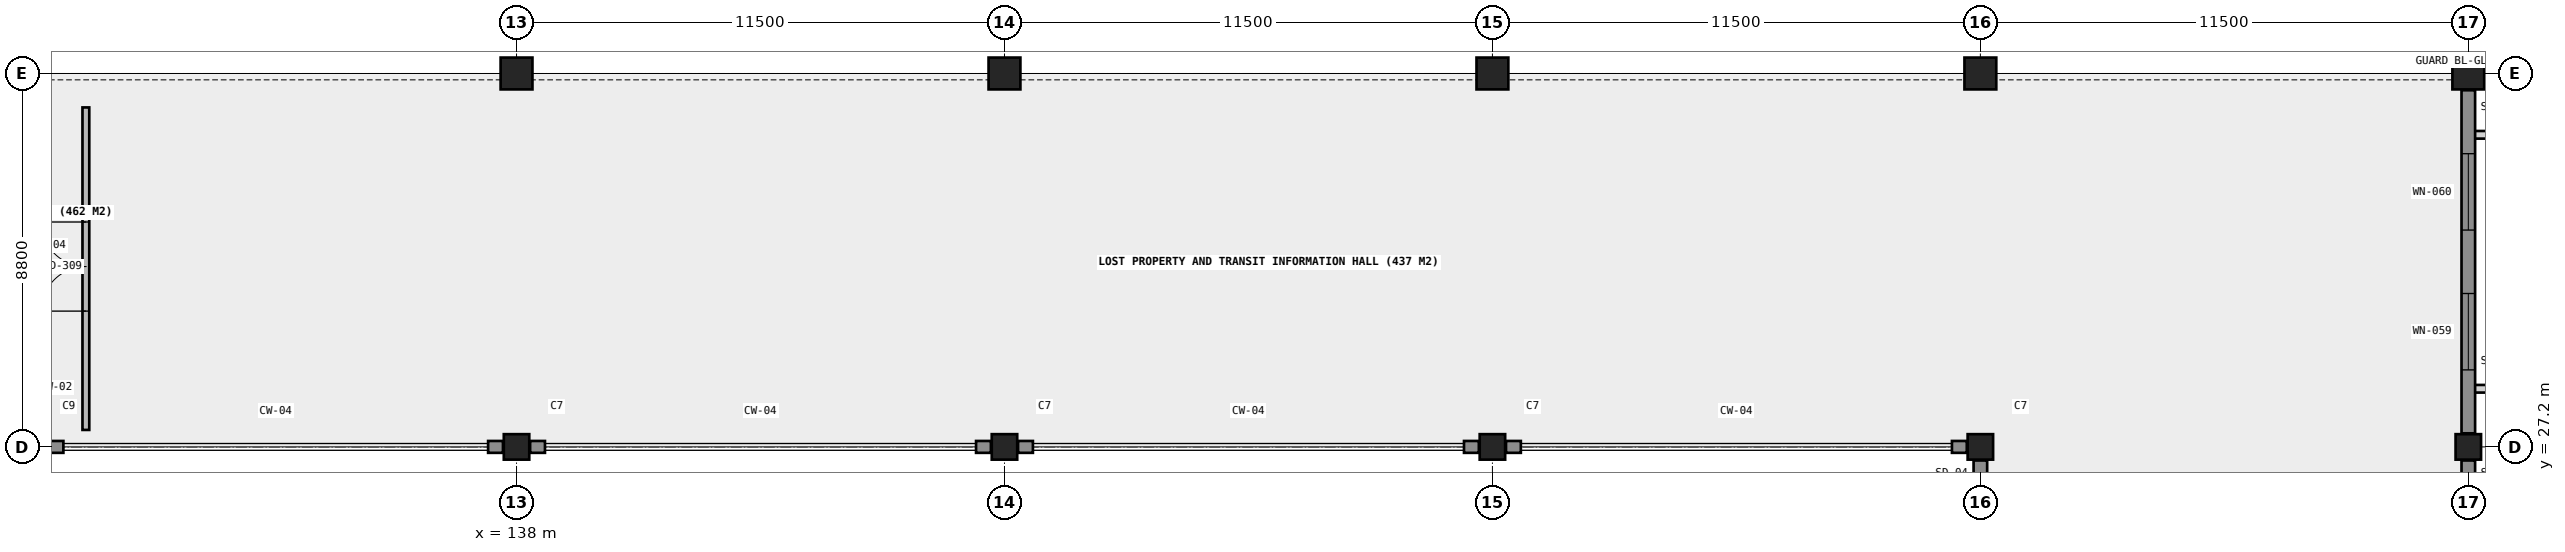
"""IFC4 building model, lengths in metres.
Left out: names, types, materials, properties, quantities, classifications, styles, units other than length and angle.
Written with IfcOpenShell. Run it as: python <this file> out.ifc"""

import sys

from ifc_helpers import new_model, si_unit, direction, frame, frame_2d, origin, origin_2d, place, context, subcontext, project, spatial, rectangle, extrude, element, fill, save


model = new_model("IFC4")
c1 = context("Model", 3, precision=1e-05, world=origin(), true_north=direction((0.0, 1.0)))
c2 = subcontext(c1, "Body", "Model", "MODEL_VIEW")
j1 = project(units=[si_unit("LENGTHUNIT", "METRE"), si_unit("PLANEANGLEUNIT", "RADIAN")], contexts=[c1])
p1 = place(None, origin())
s1 = spatial("IfcSite", under=j1, at=p1, CompositionType="ELEMENT")
p2 = place(p1, origin())
s2 = spatial("IfcBuilding", under=s1, at=p2, CompositionType="ELEMENT")
p3 = place(p2, frame((0.0, 0.0, 4.2)))
s3 = spatial("IfcBuildingStorey", under=s2, at=p3, CompositionType="ELEMENT", Elevation=4.2)
p4 = place(p3, frame((138.0, 27.2, 0.0), z_axis=(0.0, 0.0, 1.0), x_axis=(1.0, 0.0, 0.0)))
e1 = element("IfcColumn", 1, at=p4, inside=s3, PredefinedType="COLUMN", context=c2, shape_type="SweptSolid", body=[
    extrude(rectangle(XDim=0.6, YDim=0.6, at=origin_2d()), origin(), (0.0, 0.0, 1.0), 4.2),
])
p5 = place(p3, frame((138.0, 36.0, 0.0), z_axis=(0.0, 0.0, 1.0), x_axis=(1.0, 0.0, 0.0)))
e2 = element("IfcColumn", 2, at=p5, inside=s3, PredefinedType="COLUMN", context=c2, shape_type="SweptSolid", body=[
    extrude(rectangle(XDim=0.75, YDim=0.75, at=origin_2d()), origin(), (0.0, 0.0, 1.0), 4.2),
])
p6 = place(p3, frame((149.5, 27.2, 0.0), z_axis=(0.0, 0.0, 1.0), x_axis=(1.0, 0.0, 0.0)))
e3 = element("IfcColumn", 3, at=p6, inside=s3, PredefinedType="COLUMN", context=c2, shape_type="SweptSolid", body=[
    extrude(rectangle(XDim=0.6, YDim=0.6, at=origin_2d()), origin(), (0.0, 0.0, 1.0), 4.2),
])
p7 = place(p3, frame((149.5, 36.0, 0.0), z_axis=(0.0, 0.0, 1.0), x_axis=(1.0, 0.0, 0.0)))
e4 = element("IfcColumn", 4, at=p7, inside=s3, PredefinedType="COLUMN", context=c2, shape_type="SweptSolid", body=[
    extrude(rectangle(XDim=0.75, YDim=0.75, at=origin_2d()), origin(), (0.0, 0.0, 1.0), 4.2),
])
p8 = place(p3, frame((161.0, 27.2, 0.0), z_axis=(0.0, 0.0, 1.0), x_axis=(1.0, 0.0, 0.0)))
e5 = element("IfcColumn", 5, at=p8, inside=s3, PredefinedType="COLUMN", context=c2, shape_type="SweptSolid", body=[
    extrude(rectangle(XDim=0.6, YDim=0.6, at=origin_2d()), origin(), (0.0, 0.0, 1.0), 4.2),
])
p9 = place(p3, frame((161.0, 36.0, 0.0), z_axis=(0.0, 0.0, 1.0), x_axis=(1.0, 0.0, 0.0)))
e6 = element("IfcColumn", 6, at=p9, inside=s3, PredefinedType="COLUMN", context=c2, shape_type="SweptSolid", body=[
    extrude(rectangle(XDim=0.75, YDim=0.75, at=origin_2d()), origin(), (0.0, 0.0, 1.0), 4.2),
])
p10 = place(p3, frame((172.5, 27.2, 0.0), z_axis=(0.0, 0.0, 1.0), x_axis=(1.0, 0.0, 0.0)))
e7 = element("IfcColumn", 7, at=p10, inside=s3, PredefinedType="COLUMN", context=c2, shape_type="SweptSolid", body=[
    extrude(rectangle(XDim=0.6, YDim=0.6, at=origin_2d()), origin(), (0.0, 0.0, 1.0), 4.2),
])
p11 = place(p3, frame((172.5, 36.0, 0.0), z_axis=(0.0, 0.0, 1.0), x_axis=(1.0, 0.0, 0.0)))
e8 = element("IfcColumn", 8, at=p11, inside=s3, PredefinedType="COLUMN", context=c2, shape_type="SweptSolid", body=[
    extrude(rectangle(XDim=0.75, YDim=0.75, at=origin_2d()), origin(), (0.0, 0.0, 1.0), 4.2),
])
p12 = place(p3, frame((184.0, 27.2, 0.0), z_axis=(0.0, 0.0, 1.0), x_axis=(1.0, 0.0, 0.0)))
e9 = element("IfcColumn", 9, at=p12, inside=s3, PredefinedType="COLUMN", context=c2, shape_type="SweptSolid", body=[
    extrude(rectangle(XDim=0.6, YDim=0.6, at=origin_2d()), origin(), (0.0, 0.0, 1.0), 4.2),
])
p13 = place(p3, frame((184.0, 36.0, 0.0), z_axis=(0.0, 0.0, 1.0), x_axis=(1.0, 0.0, 0.0)))
e10 = element("IfcColumn", 10, at=p13, inside=s3, PredefinedType="COLUMN", context=c2, shape_type="SweptSolid", body=[
    extrude(rectangle(XDim=0.75, YDim=0.75, at=origin_2d()), origin(), (0.0, 0.0, 1.0), 4.2),
])
p14 = place(p3, frame((126.97, 27.2, 0.0), z_axis=(0.0, 0.0, 1.0), x_axis=(1.0, 0.0, 0.0)))
e11 = element("IfcWall", 11, at=p14, inside=s3, PredefinedType="SOLIDWALL", context=c2, shape_type="SweptSolid", body=[
    extrude(rectangle(XDim=0.35, YDim=0.28, at=frame_2d((0.175, 0.0))), origin(), (0.0, 0.0, 1.0), 3.84),
])
for number, where, z_axis, x_axis in (
    (12, (137.33, 27.2, 0.0), (0.0, 0.0, 1.0), (1.0, 0.0, 0.0)),
    (13, (138.32, 27.2, 0.0), (0.0, 0.0, 1.0), (1.0, 0.0, 0.0)),
    (14, (148.83, 27.2, 0.0), (0.0, 0.0, 1.0), (1.0, 0.0, 0.0)),
    (15, (149.82, 27.2, 0.0), (0.0, 0.0, 1.0), (1.0, 0.0, 0.0)),
    (16, (160.33, 27.2, 0.0), (0.0, 0.0, 1.0), (1.0, 0.0, 0.0)),
    (17, (161.32, 27.2, 0.0), (0.0, 0.0, 1.0), (1.0, 0.0, 0.0)),
    (18, (171.83, 27.2, 0.0), (0.0, 0.0, 1.0), (1.0, 0.0, 0.0)),
):
    element("IfcWall", number, at=place(p3, frame(where, z_axis=z_axis, x_axis=x_axis)), inside=s3, PredefinedType="SOLIDWALL", context=c2, shape_type="SweptSolid", body=[
        extrude(rectangle(XDim=0.35, YDim=0.28, at=frame_2d((0.175, 0.0))), origin(), (0.0, 0.0, 1.0), 3.84),
    ])
p15 = place(p3, frame((172.5, 17.92, 0.0), z_axis=(0.0, 0.0, 1.0), x_axis=(0.0, 1.0, 0.0)))
e19 = element("IfcWall", 19, at=p15, inside=s3, PredefinedType="SOLIDWALL", context=c2, shape_type="SweptSolid", body=[
    extrude(rectangle(XDim=8.96, YDim=0.32, at=frame_2d((4.48, 0.0))), origin(), (0.0, 0.0, 1.0), 2.95),
])
p16 = place(p15, frame((1.52, 0.0, 0.85)))
e20 = element("IfcOpeningElement", 20, at=p16, cuts=e19, PredefinedType="OPENING", context=c2, shape_type="SweptSolid", body=[
    extrude(rectangle(XDim=2.2, YDim=1.8, at=frame_2d((1.1, 0.9))), frame((0.0, 0.17, 0.0), z_axis=(0.0, -1.0, 0.0), x_axis=(1.0, 0.0, 0.0)), (0.0, 0.0, 1.0), 0.34),
])
p17 = place(p15, frame((5.24, 0.0, 0.85)))
e21 = element("IfcOpeningElement", 21, at=p17, cuts=e19, PredefinedType="OPENING", context=c2, shape_type="SweptSolid", body=[
    extrude(rectangle(XDim=2.2, YDim=1.8, at=frame_2d((1.1, 0.9))), frame((0.0, 0.17, 0.0), z_axis=(0.0, -1.0, 0.0), x_axis=(1.0, 0.0, 0.0)), (0.0, 0.0, 1.0), 0.34),
])
p18 = place(p3, frame((184.0, 17.92, 0.0), z_axis=(0.0, 0.0, 1.0), x_axis=(0.0, 1.0, 0.0)))
e22 = element("IfcWall", 22, at=p18, inside=s3, PredefinedType="SOLIDWALL", context=c2, shape_type="SweptSolid", body=[
    extrude(rectangle(XDim=8.96, YDim=0.32, at=frame_2d((4.48, 0.0))), origin(), (0.0, 0.0, 1.0), 3.15),
])
p19 = place(p18, frame((1.787, 0.0, 0.85)))
e23 = element("IfcOpeningElement", 23, at=p19, cuts=e22, PredefinedType="OPENING", context=c2, shape_type="SweptSolid", body=[
    extrude(rectangle(XDim=1.8, YDim=1.8, at=frame_2d((0.9, 0.9))), frame((0.0, 0.17, 0.0), z_axis=(0.0, -1.0, 0.0), x_axis=(1.0, 0.0, 0.0)), (0.0, 0.0, 1.0), 0.34),
])
p20 = place(p18, frame((5.373, 0.0, 0.85)))
e24 = element("IfcOpeningElement", 24, at=p20, cuts=e22, PredefinedType="OPENING", context=c2, shape_type="SweptSolid", body=[
    extrude(rectangle(XDim=1.8, YDim=1.8, at=frame_2d((0.9, 0.9))), frame((0.0, 0.17, 0.0), z_axis=(0.0, -1.0, 0.0), x_axis=(1.0, 0.0, 0.0)), (0.0, 0.0, 1.0), 0.34),
])
p21 = place(p3, frame((184.0, 27.52, 0.0), z_axis=(0.0, 0.0, 1.0), x_axis=(0.0, 1.0, 0.0)))
e25 = element("IfcWall", 25, at=p21, inside=s3, PredefinedType="SOLIDWALL", context=c2, shape_type="SweptSolid", body=[
    extrude(rectangle(XDim=8.085, YDim=0.32, at=frame_2d((4.042, 0.0))), origin(), (0.0, 0.0, 1.0), 3.15),
])
p22 = place(p21, frame((1.495, 0.0, 0.85)))
e26 = element("IfcOpeningElement", 26, at=p22, cuts=e25, PredefinedType="OPENING", context=c2, shape_type="SweptSolid", body=[
    extrude(rectangle(XDim=1.8, YDim=1.8, at=frame_2d((0.9, 0.9))), frame((0.0, 0.17, 0.0), z_axis=(0.0, -1.0, 0.0), x_axis=(1.0, 0.0, 0.0)), (0.0, 0.0, 1.0), 0.34),
])
p23 = place(p21, frame((4.79, 0.0, 0.85)))
e27 = element("IfcOpeningElement", 27, at=p23, cuts=e25, PredefinedType="OPENING", context=c2, shape_type="SweptSolid", body=[
    extrude(rectangle(XDim=1.8, YDim=1.8, at=frame_2d((0.9, 0.9))), frame((0.0, 0.17, 0.0), z_axis=(0.0, -1.0, 0.0), x_axis=(1.0, 0.0, 0.0)), (0.0, 0.0, 1.0), 0.34),
])
p24 = place(p3, frame((127.85, 27.6, 0.0), z_axis=(0.0, 0.0, 1.0), x_axis=(0.0, 1.0, 0.0)))
e28 = element("IfcWall", 28, at=p24, inside=s3, PredefinedType="PARTITIONING", context=c2, shape_type="SweptSolid", body=[
    extrude(rectangle(XDim=7.6, YDim=0.16, at=frame_2d((3.8, 0.0))), origin(), (0.0, 0.0, 1.0), 3.84),
])
p25 = place(p24, frame((2.8, 0.0, 0.0)))
e29 = element("IfcOpeningElement", 29, at=p25, cuts=e28, PredefinedType="OPENING", context=c2, shape_type="SweptSolid", body=[
    extrude(rectangle(XDim=2.1, YDim=2.35, at=frame_2d((1.05, 1.175))), frame((0.0, 0.09, 0.0), z_axis=(0.0, -1.0, 0.0), x_axis=(1.0, 0.0, 0.0)), (0.0, 0.0, 1.0), 0.18),
])
p26 = place(p22, origin())
e30 = element("IfcWindow", 30, at=p26, inside=s3, PartitioningType="SINGLE_PANEL", PredefinedType="WINDOW", context=c2, shape_type="SweptSolid", body=[
    extrude(rectangle(XDim=1.8, YDim=1.8, at=frame_2d((0.9, 0.9))), frame((0.0, 0.03, 0.0), z_axis=(0.0, -1.0, 0.0), x_axis=(1.0, 0.0, 0.0)), (0.0, 0.0, 1.0), 0.06),
])
fill(e26, e30)
p27 = place(p23, origin())
e31 = element("IfcWindow", 31, at=p27, inside=s3, PartitioningType="SINGLE_PANEL", PredefinedType="WINDOW", context=c2, shape_type="SweptSolid", body=[
    extrude(rectangle(XDim=1.8, YDim=1.8, at=frame_2d((0.9, 0.9))), frame((0.0, 0.03, 0.0), z_axis=(0.0, -1.0, 0.0), x_axis=(1.0, 0.0, 0.0)), (0.0, 0.0, 1.0), 0.06),
])
fill(e27, e31)
p28 = place(p25, origin())
e32 = element("IfcDoor", 32, at=p28, inside=s3, OperationType="DOUBLE_DOOR_SINGLE_SWING", PredefinedType="DOOR", context=c2, shape_type="SweptSolid", body=[
    extrude(rectangle(XDim=2.1, YDim=2.35, at=frame_2d((1.05, 1.175))), frame((0.0, 0.025, 0.0), z_axis=(0.0, -1.0, 0.0), x_axis=(1.0, 0.0, 0.0)), (0.0, 0.0, 1.0), 0.05),
])
fill(e29, e32)
save(model, sys.argv[1])
